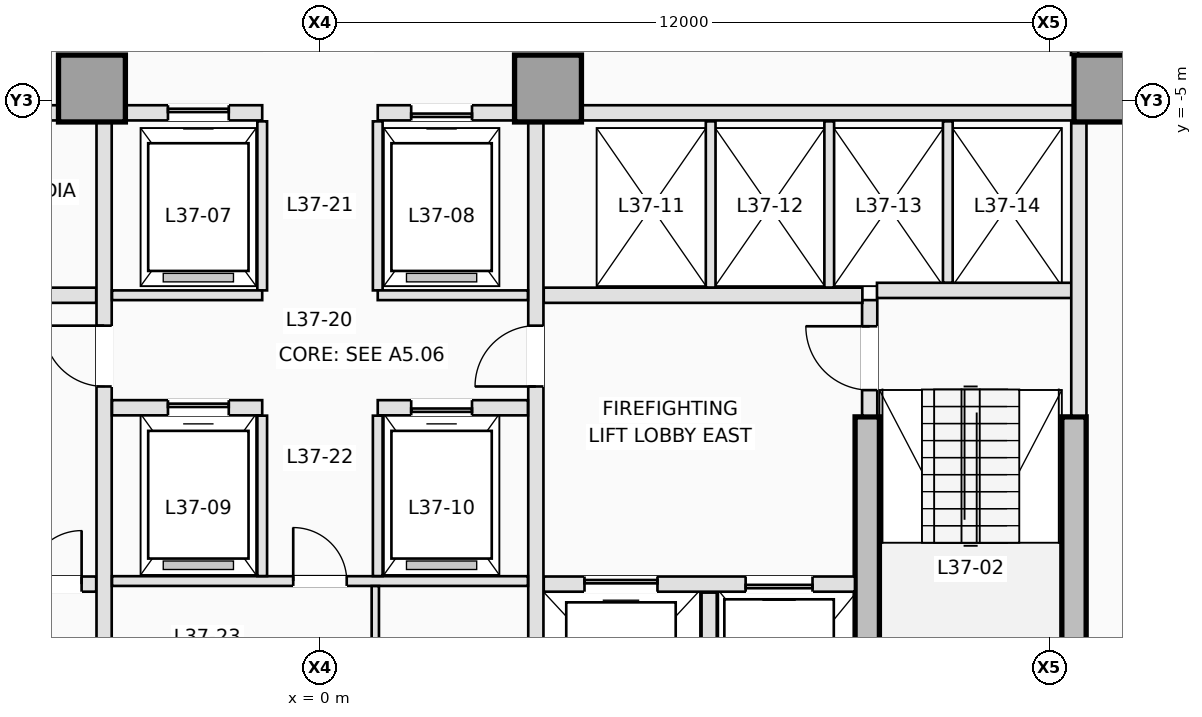
"""IFC4 building model, lengths in metres.
Left out: names, types, materials, properties, quantities, classifications, styles, units other than length and angle.
Written with IfcOpenShell. Run it as: python <this file> out.ifc"""

import sys

from ifc_helpers import new_model, si_unit, direction, frame, frame_2d, origin, origin_2d, place, context, subcontext, project, spatial, rectangle, extrude, element, fill, save


model = new_model("IFC4")
c1 = context("Model", 3, precision=1e-05, world=origin(), true_north=direction((0.0, 1.0)))
c2 = subcontext(c1, "Body", "Model", "MODEL_VIEW")
j1 = project(units=[si_unit("LENGTHUNIT", "METRE"), si_unit("PLANEANGLEUNIT", "RADIAN")], contexts=[c1])
p1 = place(None, origin())
s1 = spatial("IfcSite", under=j1, at=p1, CompositionType="ELEMENT")
p2 = place(p1, origin())
s2 = spatial("IfcBuilding", under=s1, at=p2, CompositionType="ELEMENT")
p3 = place(p2, frame((0.0, 0.0, 137.0)))
s3 = spatial("IfcBuildingStorey", under=s2, at=p3, CompositionType="ELEMENT", Elevation=137.0)
p4 = place(p3, frame((12.4, -15.7, 0.0), z_axis=(0.0, 0.0, 1.0), x_axis=(0.0, 1.0, 0.0)))
e1 = element("IfcWall", 1, at=p4, inside=s3, PredefinedType="SHEAR", context=c2, shape_type="SweptSolid", body=[
    extrude(rectangle(XDim=5.5, YDim=0.4, at=frame_2d((2.75, 0.0))), origin(), (0.0, 0.0, 1.0), 3.5),
])
p5 = place(p3, frame((9.0, -16.15, 0.0), z_axis=(0.0, 0.0, 1.0), x_axis=(0.0, 1.0, 0.0)))
e2 = element("IfcWall", 2, at=p5, inside=s3, PredefinedType="SHEAR", context=c2, shape_type="SweptSolid", body=[
    extrude(rectangle(XDim=5.95, YDim=0.4, at=frame_2d((2.975, 0.0))), origin(), (0.0, 0.0, 1.0), 3.5),
])
for number, where, z_axis, x_axis in (
    (3, (-3.75, -4.8, 0.0), (0.0, 0.0, 1.0), (1.0, 0.0, 0.0)),
    (4, (3.75, -4.8, 0.0), (0.0, 0.0, 1.0), (1.0, 0.0, 0.0)),
    (5, (12.95, -4.8, 0.0), (0.0, 0.0, 1.0), (1.0, 0.0, 0.0)),
):
    element("IfcColumn", number, at=place(p3, frame(where, z_axis=z_axis, x_axis=x_axis)), inside=s3, PredefinedType="COLUMN", context=c2, shape_type="SweptSolid", body=[
        extrude(rectangle(XDim=1.1, YDim=1.1, at=origin_2d()), origin(), (0.0, 0.0, 1.0), 3.5),
    ])
p6 = place(p3, frame((9.04, -10.18, 0.0), z_axis=(0.0, 0.0, 1.0), x_axis=(0.0, 1.0, 0.0)))
e6 = element("IfcWall", 6, at=p6, inside=s3, PredefinedType="PARTITIONING", context=c2, shape_type="SweptSolid", body=[
    extrude(rectangle(XDim=1.9, YDim=0.25, at=frame_2d((0.95, 0.0))), origin(), (0.0, 0.0, 1.0), 3.25),
])
p7 = place(p6, frame((0.42, 0.0, 0.0)))
e7 = element("IfcOpeningElement", 7, at=p7, cuts=e6, PredefinedType="OPENING", context=c2, shape_type="SweptSolid", body=[
    extrude(rectangle(XDim=1.05, YDim=2.15, at=frame_2d((0.525, 1.075))), frame((0.0, 0.135, 0.0), z_axis=(0.0, -1.0, 0.0), x_axis=(1.0, 0.0, 0.0)), (0.0, 0.0, 1.0), 0.27),
])
p8 = place(p3, frame((9.16, -8.12, 0.0), z_axis=(0.0, 0.0, 1.0), x_axis=(1.0, 0.0, 0.0)))
e8 = element("IfcWall", 8, at=p8, inside=s3, PredefinedType="PARTITIONING", context=c2, shape_type="SweptSolid", body=[
    extrude(rectangle(XDim=3.22, YDim=0.25, at=frame_2d((1.61, 0.0))), origin(), (0.0, 0.0, 1.0), 3.25),
])
p9 = place(p3, frame((12.48, -10.18, 0.0), z_axis=(0.0, 0.0, 1.0), x_axis=(0.0, 1.0, 0.0)))
e9 = element("IfcWall", 9, at=p9, inside=s3, PredefinedType="PARTITIONING", context=c2, shape_type="SweptSolid", body=[
    extrude(rectangle(XDim=4.828, YDim=0.25, at=frame_2d((2.414, 0.0))), origin(), (0.0, 0.0, 1.0), 3.25),
])
p10 = place(p3, frame((-8.798, -12.95, 0.0), z_axis=(0.0, 0.0, 1.0), x_axis=(1.0, 0.0, 0.0)))
e10 = element("IfcWall", 10, at=p10, inside=s3, PredefinedType="PARTITIONING", context=c2, shape_type="SweptSolid", body=[
    extrude(rectangle(XDim=5.118, YDim=0.25, at=frame_2d((2.559, 0.0))), origin(), (0.0, 0.0, 1.0), 3.25),
])
p11 = place(p10, frame((0.698, 0.0, 0.0)))
e11 = element("IfcOpeningElement", 11, at=p11, cuts=e10, PredefinedType="OPENING", context=c2, shape_type="SweptSolid", body=[
    extrude(rectangle(XDim=1.1, YDim=2.15, at=frame_2d((0.55, 1.075))), frame((0.0, 0.135, 0.0), z_axis=(0.0, -1.0, 0.0), x_axis=(1.0, 0.0, 0.0)), (0.0, 0.0, 1.0), 0.27),
])
p12 = place(p10, frame((2.598, 0.0, 0.0)))
e12 = element("IfcOpeningElement", 12, at=p12, cuts=e10, PredefinedType="OPENING", context=c2, shape_type="SweptSolid", body=[
    extrude(rectangle(XDim=0.88, YDim=2.1, at=frame_2d((0.44, 1.05))), frame((0.0, 0.135, 0.0), z_axis=(0.0, -1.0, 0.0), x_axis=(1.0, 0.0, 0.0)), (0.0, 0.0, 1.0), 0.27),
])
p13 = place(p10, frame((3.998, 0.0, 0.0)))
e13 = element("IfcOpeningElement", 13, at=p13, cuts=e10, PredefinedType="OPENING", context=c2, shape_type="SweptSolid", body=[
    extrude(rectangle(XDim=0.88, YDim=2.1, at=frame_2d((0.44, 1.05))), frame((0.0, 0.135, 0.0), z_axis=(0.0, -1.0, 0.0), x_axis=(1.0, 0.0, 0.0)), (0.0, 0.0, 1.0), 0.27),
])
p14 = place(p3, frame((3.68, -12.95, 0.0), z_axis=(0.0, 0.0, 1.0), x_axis=(1.0, 0.0, 0.0)))
e14 = element("IfcWall", 14, at=p14, inside=s3, PredefinedType="PARTITIONING", context=c2, shape_type="SweptSolid", body=[
    extrude(rectangle(XDim=5.118, YDim=0.25, at=frame_2d((2.559, 0.0))), origin(), (0.0, 0.0, 1.0), 3.25),
])
p15 = place(p14, frame((3.32, 0.0, 0.0)))
e15 = element("IfcOpeningElement", 15, at=p15, cuts=e14, PredefinedType="OPENING", context=c2, shape_type="SweptSolid", body=[
    extrude(rectangle(XDim=1.1, YDim=2.15, at=frame_2d((0.55, 1.075))), frame((0.0, 0.135, 0.0), z_axis=(0.0, -1.0, 0.0), x_axis=(1.0, 0.0, 0.0)), (0.0, 0.0, 1.0), 0.27),
])
p16 = place(p14, frame((0.67, 0.0, 0.0)))
e16 = element("IfcOpeningElement", 16, at=p16, cuts=e14, PredefinedType="OPENING", context=c2, shape_type="SweptSolid", body=[
    extrude(rectangle(XDim=1.2, YDim=2.15, at=frame_2d((0.6, 1.075))), frame((0.0, 0.135, 0.0), z_axis=(0.0, -1.0, 0.0), x_axis=(1.0, 0.0, 0.0)), (0.0, 0.0, 1.0), 0.27),
])
p17 = place(p3, frame((6.4, -15.92, 0.0), z_axis=(0.0, 0.0, 1.0), x_axis=(0.0, 1.0, 0.0)))
e17 = element("IfcWall", 17, at=p17, inside=s3, PredefinedType="PARTITIONING", context=c2, shape_type="SweptSolid", body=[
    extrude(rectangle(XDim=2.83, YDim=0.25, at=frame_2d((1.415, 0.0))), origin(), (0.0, 0.0, 1.0), 3.25),
])
for number, where, z_axis, x_axis in (
    (18, (-8.92, -8.2, 0.0), (0.0, 0.0, 1.0), (1.0, 0.0, 0.0)),
    (19, (3.68, -8.2, 0.0), (0.0, 0.0, 1.0), (1.0, 0.0, 0.0)),
):
    element("IfcWall", number, at=place(p3, frame(where, z_axis=z_axis, x_axis=x_axis)), inside=s3, PredefinedType="PARTITIONING", context=c2, shape_type="SweptSolid", body=[
        extrude(rectangle(XDim=5.24, YDim=0.25, at=frame_2d((2.62, 0.0))), origin(), (0.0, 0.0, 1.0), 3.25),
    ])
p18 = place(p3, frame((-3.55, -15.798, 0.0), z_axis=(0.0, 0.0, 1.0), x_axis=(0.0, 1.0, 0.0)))
e20 = element("IfcWall", 20, at=p18, inside=s3, PredefinedType="PARTITIONING", context=c2, shape_type="SweptSolid", body=[
    extrude(rectangle(XDim=10.446, YDim=0.25, at=frame_2d((5.223, 0.0))), origin(), (0.0, 0.0, 1.0), 3.25),
])
p19 = place(p18, frame((6.098, 0.0, 0.0)))
e21 = element("IfcOpeningElement", 21, at=p19, cuts=e20, PredefinedType="OPENING", context=c2, shape_type="SweptSolid", body=[
    extrude(rectangle(XDim=1.0, YDim=2.15, at=frame_2d((0.5, 1.075))), frame((0.0, 0.135, 0.0), z_axis=(0.0, -1.0, 0.0), x_axis=(1.0, 0.0, 0.0)), (0.0, 0.0, 1.0), 0.27),
])
p20 = place(p3, frame((3.55, -15.798, 0.0), z_axis=(0.0, 0.0, 1.0), x_axis=(0.0, 1.0, 0.0)))
e22 = element("IfcWall", 22, at=p20, inside=s3, PredefinedType="PARTITIONING", context=c2, shape_type="SweptSolid", body=[
    extrude(rectangle(XDim=10.446, YDim=0.25, at=frame_2d((5.223, 0.0))), origin(), (0.0, 0.0, 1.0), 3.25),
])
p21 = place(p20, frame((6.098, 0.0, 0.0)))
e23 = element("IfcOpeningElement", 23, at=p21, cuts=e22, PredefinedType="OPENING", context=c2, shape_type="SweptSolid", body=[
    extrude(rectangle(XDim=1.0, YDim=2.15, at=frame_2d((0.5, 1.075))), frame((0.0, 0.135, 0.0), z_axis=(0.0, -1.0, 0.0), x_axis=(1.0, 0.0, 0.0)), (0.0, 0.0, 1.0), 0.27),
])
p22 = place(p3, frame((-12.398, -5.2, 0.0), z_axis=(0.0, 0.0, 1.0), x_axis=(1.0, 0.0, 0.0)))
e24 = element("IfcWall", 24, at=p22, inside=s3, PredefinedType="PARTITIONING", context=c2, shape_type="SweptSolid", body=[
    extrude(rectangle(XDim=8.096, YDim=0.25, at=frame_2d((4.048, 0.0))), origin(), (0.0, 0.0, 1.0), 3.25),
])
p23 = place(p22, frame((2.968, 0.0, 0.0)))
e25 = element("IfcOpeningElement", 25, at=p23, cuts=e24, PredefinedType="OPENING", context=c2, shape_type="SweptSolid", body=[
    extrude(rectangle(XDim=0.92, YDim=2.12, at=frame_2d((0.46, 1.06))), frame((0.0, 0.135, 0.0), z_axis=(0.0, -1.0, 0.0), x_axis=(1.0, 0.0, 0.0)), (0.0, 0.0, 1.0), 0.27),
])
p24 = place(p22, frame((6.068, 0.0, 0.0)))
e26 = element("IfcOpeningElement", 26, at=p24, cuts=e24, PredefinedType="OPENING", context=c2, shape_type="SweptSolid", body=[
    extrude(rectangle(XDim=0.92, YDim=2.12, at=frame_2d((0.46, 1.06))), frame((0.0, 0.135, 0.0), z_axis=(0.0, -1.0, 0.0), x_axis=(1.0, 0.0, 0.0)), (0.0, 0.0, 1.0), 0.27),
])
p25 = place(p3, frame((4.302, -5.2, 0.0), z_axis=(0.0, 0.0, 1.0), x_axis=(1.0, 0.0, 0.0)))
e27 = element("IfcWall", 27, at=p25, inside=s3, PredefinedType="PARTITIONING", context=c2, shape_type="SweptSolid", body=[
    extrude(rectangle(XDim=8.096, YDim=0.25, at=frame_2d((4.048, 0.0))), origin(), (0.0, 0.0, 1.0), 3.25),
])
p26 = place(p3, frame((-3.198, -5.2, 0.0), z_axis=(0.0, 0.0, 1.0), x_axis=(1.0, 0.0, 0.0)))
e28 = element("IfcWall", 28, at=p26, inside=s3, PredefinedType="PARTITIONING", context=c2, shape_type="SweptSolid", body=[
    extrude(rectangle(XDim=2.248, YDim=0.25, at=frame_2d((1.124, 0.0))), origin(), (0.0, 0.0, 1.0), 3.25),
])
p27 = place(p26, frame((0.698, 0.0, 0.0)))
e29 = element("IfcOpeningElement", 29, at=p27, cuts=e28, PredefinedType="OPENING", context=c2, shape_type="SweptSolid", body=[
    extrude(rectangle(XDim=1.0, YDim=2.15, at=frame_2d((0.5, 1.075))), frame((0.0, 0.135, 0.0), z_axis=(0.0, -1.0, 0.0), x_axis=(1.0, 0.0, 0.0)), (0.0, 0.0, 1.0), 0.27),
])
p28 = place(p3, frame((0.95, -5.2, 0.0), z_axis=(0.0, 0.0, 1.0), x_axis=(1.0, 0.0, 0.0)))
e30 = element("IfcWall", 30, at=p28, inside=s3, PredefinedType="PARTITIONING", context=c2, shape_type="SweptSolid", body=[
    extrude(rectangle(XDim=2.248, YDim=0.25, at=frame_2d((1.124, 0.0))), origin(), (0.0, 0.0, 1.0), 3.25),
])
p29 = place(p28, frame((0.55, 0.0, 0.0)))
e31 = element("IfcOpeningElement", 31, at=p29, cuts=e30, PredefinedType="OPENING", context=c2, shape_type="SweptSolid", body=[
    extrude(rectangle(XDim=1.0, YDim=2.15, at=frame_2d((0.5, 1.075))), frame((0.0, 0.135, 0.0), z_axis=(0.0, -1.0, 0.0), x_axis=(1.0, 0.0, 0.0)), (0.0, 0.0, 1.0), 0.27),
])
for number, where, z_axis, x_axis in (
    (32, (6.425, -8.073, 0.0), (0.0, 0.0, 1.0), (0.0, 1.0, 0.0)),
    (33, (8.375, -8.073, 0.0), (0.0, 0.0, 1.0), (0.0, 1.0, 0.0)),
):
    element("IfcWall", number, at=place(p3, frame(where, z_axis=z_axis, x_axis=x_axis)), inside=s3, PredefinedType="PARTITIONING", context=c2, shape_type="SweptSolid", body=[
        extrude(rectangle(XDim=2.733, YDim=0.16, at=frame_2d((1.366, 0.0))), origin(), (0.0, 0.0, 1.0), 3.25),
    ])
p30 = place(p3, frame((10.325, -7.993, 0.0), z_axis=(0.0, 0.0, 1.0), x_axis=(0.0, 1.0, 0.0)))
e34 = element("IfcWall", 34, at=p30, inside=s3, PredefinedType="PARTITIONING", context=c2, shape_type="SweptSolid", body=[
    extrude(rectangle(XDim=2.653, YDim=0.16, at=frame_2d((1.326, 0.0))), origin(), (0.0, 0.0, 1.0), 3.25),
])
for number, where, z_axis, x_axis in (
    (35, (-0.95, -8.12, 0.0), (0.0, 0.0, 1.0), (0.0, 1.0, 0.0)),
    (36, (0.95, -8.12, 0.0), (0.0, 0.0, 1.0), (0.0, 1.0, 0.0)),
):
    element("IfcWall", number, at=place(p3, frame(where, z_axis=z_axis, x_axis=x_axis)), inside=s3, PredefinedType="PARTITIONING", context=c2, shape_type="SweptSolid", body=[
        extrude(rectangle(XDim=2.78, YDim=0.16, at=frame_2d((1.39, 0.0))), origin(), (0.0, 0.0, 1.0), 3.25),
    ])
for number, where, z_axis, x_axis in (
    (37, (-3.42, -8.2, 0.0), (0.0, 0.0, 1.0), (1.0, 0.0, 0.0)),
    (38, (0.95, -8.2, 0.0), (0.0, 0.0, 1.0), (1.0, 0.0, 0.0)),
):
    element("IfcWall", number, at=place(p3, frame(where, z_axis=z_axis, x_axis=x_axis)), inside=s3, PredefinedType="PARTITIONING", context=c2, shape_type="SweptSolid", body=[
        extrude(rectangle(XDim=2.47, YDim=0.16, at=frame_2d((1.235, 0.0))), origin(), (0.0, 0.0, 1.0), 3.25),
    ])
p31 = place(p3, frame((-3.42, -10.05, 0.0), z_axis=(0.0, 0.0, 1.0), x_axis=(1.0, 0.0, 0.0)))
e39 = element("IfcWall", 39, at=p31, inside=s3, PredefinedType="PARTITIONING", context=c2, shape_type="SweptSolid", body=[
    extrude(rectangle(XDim=2.47, YDim=0.25, at=frame_2d((1.235, 0.0))), origin(), (0.0, 0.0, 1.0), 3.25),
])
p32 = place(p31, frame((0.92, 0.0, 0.0)))
e40 = element("IfcOpeningElement", 40, at=p32, cuts=e39, PredefinedType="OPENING", context=c2, shape_type="SweptSolid", body=[
    extrude(rectangle(XDim=1.0, YDim=2.15, at=frame_2d((0.5, 1.075))), frame((0.0, 0.135, 0.0), z_axis=(0.0, -1.0, 0.0), x_axis=(1.0, 0.0, 0.0)), (0.0, 0.0, 1.0), 0.27),
])
p33 = place(p3, frame((0.95, -10.05, 0.0), z_axis=(0.0, 0.0, 1.0), x_axis=(1.0, 0.0, 0.0)))
e41 = element("IfcWall", 41, at=p33, inside=s3, PredefinedType="PARTITIONING", context=c2, shape_type="SweptSolid", body=[
    extrude(rectangle(XDim=2.47, YDim=0.25, at=frame_2d((1.235, 0.0))), origin(), (0.0, 0.0, 1.0), 3.25),
])
p34 = place(p33, frame((0.55, 0.0, 0.0)))
e42 = element("IfcOpeningElement", 42, at=p34, cuts=e41, PredefinedType="OPENING", context=c2, shape_type="SweptSolid", body=[
    extrude(rectangle(XDim=1.0, YDim=2.15, at=frame_2d((0.5, 1.075))), frame((0.0, 0.135, 0.0), z_axis=(0.0, -1.0, 0.0), x_axis=(1.0, 0.0, 0.0)), (0.0, 0.0, 1.0), 0.27),
])
p35 = place(p3, frame((-3.42, -12.9, 0.0), z_axis=(0.0, 0.0, 1.0), x_axis=(1.0, 0.0, 0.0)))
e43 = element("IfcWall", 43, at=p35, inside=s3, PredefinedType="PARTITIONING", context=c2, shape_type="SweptSolid", body=[
    extrude(rectangle(XDim=6.84, YDim=0.16, at=frame_2d((3.42, 0.0))), origin(), (0.0, 0.0, 1.0), 3.25),
])
p36 = place(p35, frame((2.98, 0.0, 0.0)))
e44 = element("IfcOpeningElement", 44, at=p36, cuts=e43, PredefinedType="OPENING", context=c2, shape_type="SweptSolid", body=[
    extrude(rectangle(XDim=0.88, YDim=2.12, at=frame_2d((0.44, 1.06))), frame((0.0, 0.09, 0.0), z_axis=(0.0, -1.0, 0.0), x_axis=(1.0, 0.0, 0.0)), (0.0, 0.0, 1.0), 0.18),
])
for number, where, z_axis, x_axis in (
    (45, (-0.95, -12.818, 0.0), (0.0, 0.0, 1.0), (0.0, 1.0, 0.0)),
    (46, (0.95, -12.818, 0.0), (0.0, 0.0, 1.0), (0.0, 1.0, 0.0)),
):
    element("IfcWall", number, at=place(p3, frame(where, z_axis=z_axis, x_axis=x_axis)), inside=s3, PredefinedType="PARTITIONING", context=c2, shape_type="SweptSolid", body=[
        extrude(rectangle(XDim=2.638, YDim=0.16, at=frame_2d((1.319, 0.0))), origin(), (0.0, 0.0, 1.0), 3.25),
    ])
p37 = place(p3, frame((0.91, -16.02, 0.0), z_axis=(0.0, 0.0, 1.0), x_axis=(0.0, 1.0, 0.0)))
e47 = element("IfcWall", 47, at=p37, inside=s3, PredefinedType="PARTITIONING", context=c2, shape_type="SweptSolid", body=[
    extrude(rectangle(XDim=3.038, YDim=0.12, at=frame_2d((1.519, 0.0))), origin(), (0.0, 0.0, 1.0), 3.25),
])
p38 = place(p37, frame((1.05, 0.0, 0.0)))
e48 = element("IfcOpeningElement", 48, at=p38, cuts=e47, PredefinedType="OPENING", context=c2, shape_type="SweptSolid", body=[
    extrude(rectangle(XDim=0.88, YDim=2.12, at=frame_2d((0.44, 1.06))), frame((0.0, 0.07, 0.0), z_axis=(0.0, -1.0, 0.0), x_axis=(1.0, 0.0, 0.0)), (0.0, 0.0, 1.0), 0.14),
])
p39 = place(p3, frame((12.41, -2.462, 0.0), z_axis=(0.0, 0.0, 1.0), x_axis=(0.0, -1.0, 0.0)))
e49 = element("IfcWall", 49, at=p39, inside=s3, PredefinedType="PARTITIONING", context=c2, shape_type="SweptSolid", body=[
    extrude(rectangle(XDim=1.786, YDim=0.12, at=frame_2d((0.893, 0.0))), origin(), (0.0, 0.0, 1.0), 3.25),
])
p40 = place(p39, frame((0.623, 0.0, 0.0)))
e50 = element("IfcOpeningElement", 50, at=p40, cuts=e49, PredefinedType="OPENING", context=c2, shape_type="SweptSolid", body=[
    extrude(rectangle(XDim=0.92, YDim=2.12, at=frame_2d((0.46, 1.06))), frame((0.0, 0.07, 0.0), z_axis=(0.0, -1.0, 0.0), x_axis=(1.0, 0.0, 0.0)), (0.0, 0.0, 1.0), 0.14),
])
p41 = place(p27, origin())
e51 = element("IfcDoor", 51, at=p41, inside=s3, OperationType="SLIDING_TO_LEFT", PredefinedType="DOOR", context=c2, shape_type="SweptSolid", body=[
    extrude(rectangle(XDim=1.0, YDim=2.15, at=frame_2d((0.5, 1.075))), frame((0.0, 0.025, 0.0), z_axis=(0.0, -1.0, 0.0), x_axis=(1.0, 0.0, 0.0)), (0.0, 0.0, 1.0), 0.05),
])
fill(e29, e51)
p42 = place(p29, origin())
e52 = element("IfcDoor", 52, at=p42, inside=s3, OperationType="SLIDING_TO_RIGHT", PredefinedType="DOOR", context=c2, shape_type="SweptSolid", body=[
    extrude(rectangle(XDim=1.0, YDim=2.15, at=frame_2d((0.5, 1.075))), frame((0.0, 0.025, 0.0), z_axis=(0.0, -1.0, 0.0), x_axis=(1.0, 0.0, 0.0)), (0.0, 0.0, 1.0), 0.05),
])
fill(e31, e52)
p43 = place(p15, origin())
e53 = element("IfcDoor", 53, at=p43, inside=s3, OperationType="SLIDING_TO_RIGHT", PredefinedType="DOOR", context=c2, shape_type="SweptSolid", body=[
    extrude(rectangle(XDim=1.1, YDim=2.15, at=frame_2d((0.55, 1.075))), frame((0.0, 0.025, 0.0), z_axis=(0.0, -1.0, 0.0), x_axis=(1.0, 0.0, 0.0)), (0.0, 0.0, 1.0), 0.05),
])
fill(e15, e53)
p44 = place(p16, origin())
e54 = element("IfcDoor", 54, at=p44, inside=s3, OperationType="SLIDING_TO_LEFT", PredefinedType="DOOR", context=c2, shape_type="SweptSolid", body=[
    extrude(rectangle(XDim=1.2, YDim=2.15, at=frame_2d((0.6, 1.075))), frame((0.0, 0.025, 0.0), z_axis=(0.0, -1.0, 0.0), x_axis=(1.0, 0.0, 0.0)), (0.0, 0.0, 1.0), 0.05),
])
fill(e16, e54)
p45 = place(p32, origin())
e55 = element("IfcDoor", 55, at=p45, inside=s3, OperationType="SLIDING_TO_LEFT", PredefinedType="DOOR", context=c2, shape_type="SweptSolid", body=[
    extrude(rectangle(XDim=1.0, YDim=2.15, at=frame_2d((0.5, 1.075))), frame((0.0, 0.025, 0.0), z_axis=(0.0, -1.0, 0.0), x_axis=(1.0, 0.0, 0.0)), (0.0, 0.0, 1.0), 0.05),
])
fill(e40, e55)
p46 = place(p34, origin())
e56 = element("IfcDoor", 56, at=p46, inside=s3, OperationType="SLIDING_TO_RIGHT", PredefinedType="DOOR", context=c2, shape_type="SweptSolid", body=[
    extrude(rectangle(XDim=1.0, YDim=2.15, at=frame_2d((0.5, 1.075))), frame((0.0, 0.025, 0.0), z_axis=(0.0, -1.0, 0.0), x_axis=(1.0, 0.0, 0.0)), (0.0, 0.0, 1.0), 0.05),
])
fill(e42, e56)
p47 = place(p7, origin())
e57 = element("IfcDoor", 57, at=p47, inside=s3, OperationType="SINGLE_SWING_RIGHT", PredefinedType="DOOR", context=c2, shape_type="SweptSolid", body=[
    extrude(rectangle(XDim=1.05, YDim=2.15, at=frame_2d((0.525, 1.075))), frame((0.0, 0.025, 0.0), z_axis=(0.0, -1.0, 0.0), x_axis=(1.0, 0.0, 0.0)), (0.0, 0.0, 1.0), 0.05),
])
fill(e7, e57)
p48 = place(p13, origin())
e58 = element("IfcDoor", 58, at=p48, inside=s3, OperationType="SINGLE_SWING_RIGHT", PredefinedType="TRAPDOOR", context=c2, shape_type="SweptSolid", body=[
    extrude(rectangle(XDim=0.88, YDim=2.1, at=frame_2d((0.44, 1.05))), frame((0.0, 0.025, 0.0), z_axis=(0.0, -1.0, 0.0), x_axis=(1.0, 0.0, 0.0)), (0.0, 0.0, 1.0), 0.05),
])
fill(e13, e58)
p49 = place(p19, origin())
e59 = element("IfcDoor", 59, at=p49, inside=s3, OperationType="SINGLE_SWING_RIGHT", PredefinedType="DOOR", context=c2, shape_type="SweptSolid", body=[
    extrude(rectangle(XDim=1.0, YDim=2.15, at=frame_2d((0.5, 1.075))), frame((0.0, 0.025, 0.0), z_axis=(0.0, -1.0, 0.0), x_axis=(1.0, 0.0, 0.0)), (0.0, 0.0, 1.0), 0.05),
])
fill(e21, e59)
p50 = place(p21, origin())
e60 = element("IfcDoor", 60, at=p50, inside=s3, OperationType="SINGLE_SWING_LEFT", PredefinedType="DOOR", context=c2, shape_type="SweptSolid", body=[
    extrude(rectangle(XDim=1.0, YDim=2.15, at=frame_2d((0.5, 1.075))), frame((0.0, 0.025, 0.0), z_axis=(0.0, -1.0, 0.0), x_axis=(1.0, 0.0, 0.0)), (0.0, 0.0, 1.0), 0.05),
])
fill(e23, e60)
p51 = place(p36, origin())
e61 = element("IfcDoor", 61, at=p51, inside=s3, OperationType="SINGLE_SWING_LEFT", PredefinedType="DOOR", context=c2, shape_type="SweptSolid", body=[
    extrude(rectangle(XDim=0.88, YDim=2.12, at=frame_2d((0.44, 1.06))), frame((0.0, 0.025, 0.0), z_axis=(0.0, -1.0, 0.0), x_axis=(1.0, 0.0, 0.0)), (0.0, 0.0, 1.0), 0.05),
])
fill(e44, e61)
save(model, sys.argv[1])
